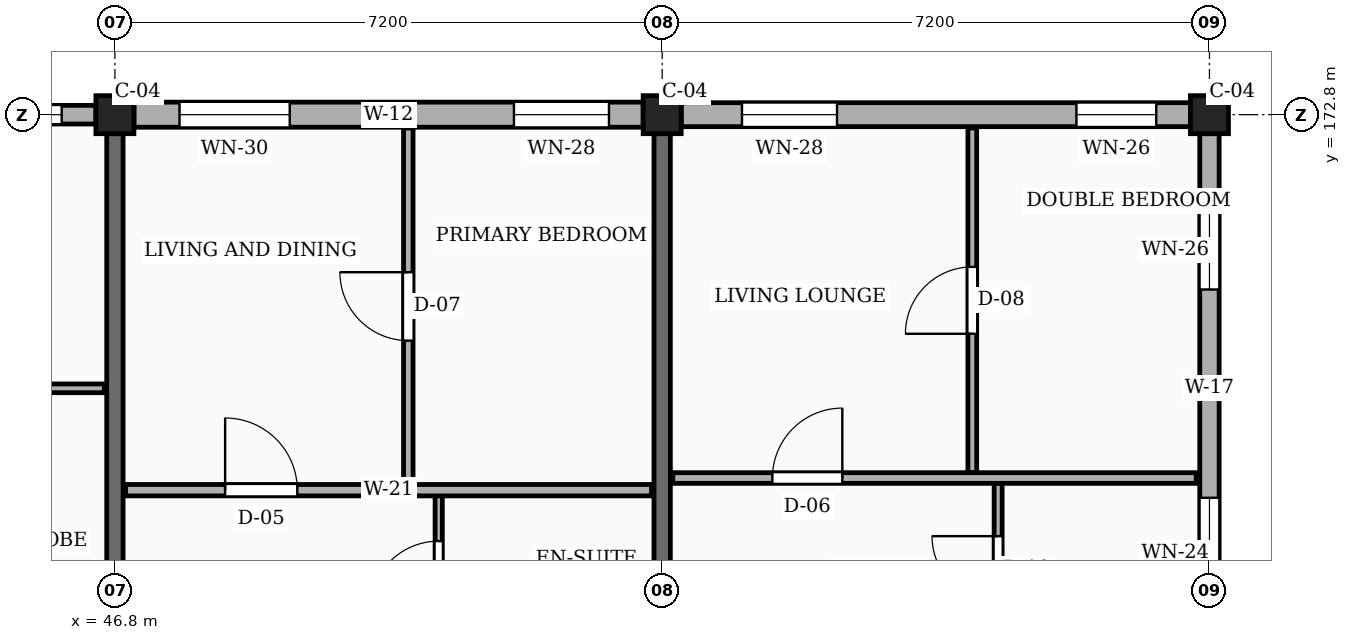
"""IFC4 building model, lengths in metres.
Left out: names, types, materials, properties, quantities, classifications, styles, units other than length and angle.
Written with IfcOpenShell. Run it as: python <this file> out.ifc"""

import sys

from ifc_helpers import new_model, si_unit, direction, frame, frame_2d, origin, origin_2d, place, context, subcontext, project, spatial, rectangle, extrude, element, fill, save


model = new_model("IFC4")
c1 = context("Model", 3, precision=1e-05, world=origin(), true_north=direction((0.0, 1.0)))
c2 = subcontext(c1, "Body", "Model", "MODEL_VIEW")
j1 = project(units=[si_unit("LENGTHUNIT", "METRE"), si_unit("PLANEANGLEUNIT", "RADIAN")], contexts=[c1])
p1 = place(None, origin())
s1 = spatial("IfcSite", under=j1, at=p1, CompositionType="ELEMENT")
p2 = place(p1, origin())
s2 = spatial("IfcBuilding", under=s1, at=p2, CompositionType="ELEMENT")
p3 = place(p2, frame((0.0, 0.0, 29.7)))
s3 = spatial("IfcBuildingStorey", under=s2, at=p3, CompositionType="ELEMENT", Elevation=29.7)
for number, where, z_axis, x_axis in (
    (1, (46.8, 172.8, 0.0), (0.0, 0.0, 1.0), (1.0, 0.0, 0.0)),
    (2, (54.0, 172.8, 0.0), (0.0, 0.0, 1.0), (1.0, 0.0, 0.0)),
    (3, (61.2, 172.8, 0.0), (0.0, 0.0, 1.0), (1.0, 0.0, 0.0)),
):
    element("IfcColumn", number, at=place(p3, frame(where, z_axis=z_axis, x_axis=x_axis)), inside=s3, PredefinedType="COLUMN", context=c2, shape_type="SweptSolid", body=[
        extrude(rectangle(XDim=0.5, YDim=0.5, at=origin_2d()), origin(), (0.0, 0.0, 1.0), 3.15),
    ])
for number, where, z_axis, x_axis in (
    (4, (46.8, 165.9, 0.0), (0.0, 0.0, 1.0), (0.0, 1.0, 0.0)),
    (5, (54.0, 165.9, 0.0), (0.0, 0.0, 1.0), (0.0, 1.0, 0.0)),
):
    element("IfcWall", number, at=place(p3, frame(where, z_axis=z_axis, x_axis=x_axis)), inside=s3, PredefinedType="SOLIDWALL", context=c2, shape_type="SweptSolid", body=[
        extrude(rectangle(XDim=6.65, YDim=0.215, at=frame_2d((3.325, 0.0))), origin(), (0.0, 0.0, 1.0), 2.185),
    ])
p4 = place(p3, frame((61.2, 165.85, 0.0), z_axis=(0.0, 0.0, 1.0), x_axis=(0.0, 1.0, 0.0)))
e6 = element("IfcWall", 6, at=p4, inside=s3, PredefinedType="SOLIDWALL", context=c2, shape_type="SweptSolid", body=[
    extrude(rectangle(XDim=6.7, YDim=0.255, at=frame_2d((3.35, 0.0))), origin(), (0.0, 0.0, 1.0), 2.455),
])
p5 = place(p4, frame((0.45, 0.0, 0.78)))
e7 = element("IfcOpeningElement", 7, at=p5, cuts=e6, PredefinedType="OPENING", context=c2, shape_type="SweptSolid", body=[
    extrude(rectangle(XDim=1.46, YDim=1.36, at=frame_2d((0.73, 0.68))), frame((0.0, 0.137, 0.0), z_axis=(0.0, -1.0, 0.0), x_axis=(1.0, 0.0, 0.0)), (0.0, 0.0, 1.0), 0.275),
])
p6 = place(p4, frame((4.65, 0.0, 0.78)))
e8 = element("IfcOpeningElement", 8, at=p6, cuts=e6, PredefinedType="OPENING", context=c2, shape_type="SweptSolid", body=[
    extrude(rectangle(XDim=1.05, YDim=1.44, at=frame_2d((0.525, 0.72))), frame((0.0, 0.137, 0.0), z_axis=(0.0, -1.0, 0.0), x_axis=(1.0, 0.0, 0.0)), (0.0, 0.0, 1.0), 0.275),
])
p7 = place(p3, frame((60.95, 172.8, 0.0), z_axis=(0.0, 0.0, 1.0), x_axis=(-1.0, 0.0, 0.0)))
e9 = element("IfcWall", 9, at=p7, inside=s3, PredefinedType="SOLIDWALL", context=c2, shape_type="SweptSolid", body=[
    extrude(rectangle(XDim=6.7, YDim=0.315, at=frame_2d((3.35, 0.0))), origin(), (0.0, 0.0, 1.0), 2.455),
])
p8 = place(p7, frame((0.45, 0.0, 0.78)))
e10 = element("IfcOpeningElement", 10, at=p8, cuts=e9, PredefinedType="OPENING", context=c2, shape_type="SweptSolid", body=[
    extrude(rectangle(XDim=1.05, YDim=1.44, at=frame_2d((0.525, 0.72))), frame((0.0, 0.167, 0.0), z_axis=(0.0, -1.0, 0.0), x_axis=(1.0, 0.0, 0.0)), (0.0, 0.0, 1.0), 0.335),
])
p9 = place(p7, frame((4.65, 0.0, 0.78)))
e11 = element("IfcOpeningElement", 11, at=p9, cuts=e9, PredefinedType="OPENING", context=c2, shape_type="SweptSolid", body=[
    extrude(rectangle(XDim=1.25, YDim=1.44, at=frame_2d((0.625, 0.72))), frame((0.0, 0.167, 0.0), z_axis=(0.0, -1.0, 0.0), x_axis=(1.0, 0.0, 0.0)), (0.0, 0.0, 1.0), 0.335),
])
p10 = place(p3, frame((53.75, 172.8, 0.0), z_axis=(0.0, 0.0, 1.0), x_axis=(-1.0, 0.0, 0.0)))
e12 = element("IfcWall", 12, at=p10, inside=s3, PredefinedType="SOLIDWALL", context=c2, shape_type="SweptSolid", body=[
    extrude(rectangle(XDim=6.7, YDim=0.33, at=frame_2d((3.35, 0.0))), origin(), (0.0, 0.0, 1.0), 2.455),
])
p11 = place(p10, frame((0.45, 0.0, 0.78)))
e13 = element("IfcOpeningElement", 13, at=p11, cuts=e12, PredefinedType="OPENING", context=c2, shape_type="SweptSolid", body=[
    extrude(rectangle(XDim=1.25, YDim=1.44, at=frame_2d((0.625, 0.72))), frame((0.0, 0.175, 0.0), z_axis=(0.0, -1.0, 0.0), x_axis=(1.0, 0.0, 0.0)), (0.0, 0.0, 1.0), 0.35),
])
p12 = place(p10, frame((4.65, 0.0, 0.78)))
e14 = element("IfcOpeningElement", 14, at=p12, cuts=e12, PredefinedType="OPENING", context=c2, shape_type="SweptSolid", body=[
    extrude(rectangle(XDim=1.45, YDim=1.44, at=frame_2d((0.725, 0.72))), frame((0.0, 0.175, 0.0), z_axis=(0.0, -1.0, 0.0), x_axis=(1.0, 0.0, 0.0)), (0.0, 0.0, 1.0), 0.35),
])
p13 = place(p3, frame((46.55, 172.8, 0.0), z_axis=(0.0, 0.0, 1.0), x_axis=(-1.0, 0.0, 0.0)))
e15 = element("IfcWall", 15, at=p13, inside=s3, PredefinedType="SOLIDWALL", context=c2, shape_type="SweptSolid", body=[
    extrude(rectangle(XDim=6.7, YDim=0.245, at=frame_2d((3.35, 0.0))), origin(), (0.0, 0.0, 1.0), 2.455),
])
p14 = place(p13, frame((0.45, 0.0, 0.78)))
e16 = element("IfcOpeningElement", 16, at=p14, cuts=e15, PredefinedType="OPENING", context=c2, shape_type="SweptSolid", body=[
    extrude(rectangle(XDim=1.45, YDim=1.44, at=frame_2d((0.725, 0.72))), frame((0.0, 0.133, 0.0), z_axis=(0.0, -1.0, 0.0), x_axis=(1.0, 0.0, 0.0)), (0.0, 0.0, 1.0), 0.265),
])
p15 = place(p13, frame((4.65, 0.0, 0.78)))
e17 = element("IfcOpeningElement", 17, at=p15, cuts=e15, PredefinedType="OPENING", context=c2, shape_type="SweptSolid", body=[
    extrude(rectangle(XDim=0.92, YDim=1.15, at=frame_2d((0.46, 0.575))), frame((0.0, 0.133, 0.0), z_axis=(0.0, -1.0, 0.0), x_axis=(1.0, 0.0, 0.0)), (0.0, 0.0, 1.0), 0.265),
])
p16 = place(p3, frame((39.74, 169.2, 0.0), z_axis=(0.0, 0.0, 1.0), x_axis=(1.0, 0.0, 0.0)))
e18 = element("IfcWall", 18, at=p16, inside=s3, PredefinedType="PARTITIONING", context=c2, shape_type="SweptSolid", body=[
    extrude(rectangle(XDim=6.92, YDim=0.115, at=frame_2d((3.46, 0.0))), origin(), (0.0, 0.0, 1.0), 2.32),
])
p17 = place(p16, frame((1.05, 0.0, 0.0)))
e19 = element("IfcOpeningElement", 19, at=p17, cuts=e18, PredefinedType="OPENING", context=c2, shape_type="SweptSolid", body=[
    extrude(rectangle(XDim=0.87, YDim=2.05, at=frame_2d((0.435, 1.025))), frame((0.0, 0.067, 0.0), z_axis=(0.0, -1.0, 0.0), x_axis=(1.0, 0.0, 0.0)), (0.0, 0.0, 1.0), 0.135),
])
p18 = place(p16, frame((4.45, 0.0, 0.0)))
e20 = element("IfcOpeningElement", 20, at=p18, cuts=e18, PredefinedType="OPENING", context=c2, shape_type="SweptSolid", body=[
    extrude(rectangle(XDim=0.88, YDim=2.08, at=frame_2d((0.44, 1.04))), frame((0.0, 0.067, 0.0), z_axis=(0.0, -1.0, 0.0), x_axis=(1.0, 0.0, 0.0)), (0.0, 0.0, 1.0), 0.135),
])
p19 = place(p3, frame((50.66, 167.93, 0.0), z_axis=(0.0, 0.0, 1.0), x_axis=(0.0, 1.0, 0.0)))
e21 = element("IfcWall", 21, at=p19, inside=s3, PredefinedType="PARTITIONING", context=c2, shape_type="SweptSolid", body=[
    extrude(rectangle(XDim=4.695, YDim=0.125, at=frame_2d((2.348, 0.0))), origin(), (0.0, 0.0, 1.0), 2.32),
])
p20 = place(p19, frame((1.897, 0.0, 0.0)))
e22 = element("IfcOpeningElement", 22, at=p20, cuts=e21, PredefinedType="OPENING", context=c2, shape_type="SweptSolid", body=[
    extrude(rectangle(XDim=0.9, YDim=2.1, at=frame_2d((0.45, 1.05))), frame((0.0, 0.073, 0.0), z_axis=(0.0, -1.0, 0.0), x_axis=(1.0, 0.0, 0.0)), (0.0, 0.0, 1.0), 0.145),
])
p21 = place(p3, frame((51.06, 165.69, 0.0), z_axis=(0.0, 0.0, 1.0), x_axis=(0.0, 1.0, 0.0)))
e23 = element("IfcWall", 23, at=p21, inside=s3, PredefinedType="PARTITIONING", context=c2, shape_type="SweptSolid", body=[
    extrude(rectangle(XDim=2.1, YDim=0.095, at=frame_2d((1.05, 0.0))), origin(), (0.0, 0.0, 1.0), 2.32),
])
p22 = place(p21, frame((0.6, 0.0, 0.0)))
e24 = element("IfcOpeningElement", 24, at=p22, cuts=e23, PredefinedType="OPENING", context=c2, shape_type="SweptSolid", body=[
    extrude(rectangle(XDim=0.9, YDim=2.05, at=frame_2d((0.45, 1.025))), frame((0.0, 0.058, 0.0), z_axis=(0.0, -1.0, 0.0), x_axis=(1.0, 0.0, 0.0)), (0.0, 0.0, 1.0), 0.115),
])
p23 = place(p3, frame((46.94, 167.86, 0.0), z_axis=(0.0, 0.0, 1.0), x_axis=(1.0, 0.0, 0.0)))
e25 = element("IfcWall", 25, at=p23, inside=s3, PredefinedType="PARTITIONING", context=c2, shape_type="SweptSolid", body=[
    extrude(rectangle(XDim=6.92, YDim=0.15, at=frame_2d((3.46, 0.0))), origin(), (0.0, 0.0, 1.0), 2.32),
])
p24 = place(p23, frame((1.31, 0.0, 0.0)))
e26 = element("IfcOpeningElement", 26, at=p24, cuts=e25, PredefinedType="OPENING", context=c2, shape_type="SweptSolid", body=[
    extrude(rectangle(XDim=0.95, YDim=2.1, at=frame_2d((0.475, 1.05))), frame((0.0, 0.085, 0.0), z_axis=(0.0, -1.0, 0.0), x_axis=(1.0, 0.0, 0.0)), (0.0, 0.0, 1.0), 0.17),
])
p25 = place(p3, frame((58.08, 168.09, 0.0), z_axis=(0.0, 0.0, 1.0), x_axis=(0.0, 1.0, 0.0)))
e27 = element("IfcWall", 27, at=p25, inside=s3, PredefinedType="PARTITIONING", context=c2, shape_type="SweptSolid", body=[
    extrude(rectangle(XDim=4.535, YDim=0.115, at=frame_2d((2.268, 0.0))), origin(), (0.0, 0.0, 1.0), 2.32),
])
p26 = place(p25, frame((1.827, 0.0, 0.0)))
e28 = element("IfcOpeningElement", 28, at=p26, cuts=e27, PredefinedType="OPENING", context=c2, shape_type="SweptSolid", body=[
    extrude(rectangle(XDim=0.88, YDim=2.08, at=frame_2d((0.44, 1.04))), frame((0.0, 0.067, 0.0), z_axis=(0.0, -1.0, 0.0), x_axis=(1.0, 0.0, 0.0)), (0.0, 0.0, 1.0), 0.135),
])
p27 = place(p3, frame((58.42, 165.69, 0.0), z_axis=(0.0, 0.0, 1.0), x_axis=(0.0, 1.0, 0.0)))
e29 = element("IfcWall", 29, at=p27, inside=s3, PredefinedType="PARTITIONING", context=c2, shape_type="SweptSolid", body=[
    extrude(rectangle(XDim=2.26, YDim=0.105, at=frame_2d((1.13, 0.0))), origin(), (0.0, 0.0, 1.0), 2.32),
])
p28 = place(p27, frame((0.695, 0.0, 0.0)))
e30 = element("IfcOpeningElement", 30, at=p28, cuts=e29, PredefinedType="OPENING", context=c2, shape_type="SweptSolid", body=[
    extrude(rectangle(XDim=0.87, YDim=2.05, at=frame_2d((0.435, 1.025))), frame((0.0, 0.062, 0.0), z_axis=(0.0, -1.0, 0.0), x_axis=(1.0, 0.0, 0.0)), (0.0, 0.0, 1.0), 0.125),
])
p29 = place(p3, frame((54.14, 168.02, 0.0), z_axis=(0.0, 0.0, 1.0), x_axis=(1.0, 0.0, 0.0)))
e31 = element("IfcWall", 31, at=p29, inside=s3, PredefinedType="PARTITIONING", context=c2, shape_type="SweptSolid", body=[
    extrude(rectangle(XDim=6.885, YDim=0.14, at=frame_2d((3.442, 0.0))), origin(), (0.0, 0.0, 1.0), 2.32),
])
p30 = place(p29, frame((1.31, 0.0, 0.0)))
e32 = element("IfcOpeningElement", 32, at=p30, cuts=e31, PredefinedType="OPENING", context=c2, shape_type="SweptSolid", body=[
    extrude(rectangle(XDim=0.92, YDim=2.1, at=frame_2d((0.46, 1.05))), frame((0.0, 0.08, 0.0), z_axis=(0.0, -1.0, 0.0), x_axis=(1.0, 0.0, 0.0)), (0.0, 0.0, 1.0), 0.16),
])
p31 = place(p5, origin())
e33 = element("IfcWindow", 33, at=p31, inside=s3, PartitioningType="SINGLE_PANEL", PredefinedType="WINDOW", context=c2, shape_type="SweptSolid", body=[
    extrude(rectangle(XDim=1.46, YDim=1.36, at=frame_2d((0.73, 0.68))), frame((0.0, 0.03, 0.0), z_axis=(0.0, -1.0, 0.0), x_axis=(1.0, 0.0, 0.0)), (0.0, 0.0, 1.0), 0.06),
])
fill(e7, e33)
p32 = place(p6, origin())
e34 = element("IfcWindow", 34, at=p32, inside=s3, PartitioningType="SINGLE_PANEL", PredefinedType="WINDOW", context=c2, shape_type="SweptSolid", body=[
    extrude(rectangle(XDim=1.05, YDim=1.44, at=frame_2d((0.525, 0.72))), frame((0.0, 0.03, 0.0), z_axis=(0.0, -1.0, 0.0), x_axis=(1.0, 0.0, 0.0)), (0.0, 0.0, 1.0), 0.06),
])
fill(e8, e34)
p33 = place(p8, origin())
e35 = element("IfcWindow", 35, at=p33, inside=s3, PartitioningType="SINGLE_PANEL", PredefinedType="WINDOW", context=c2, shape_type="SweptSolid", body=[
    extrude(rectangle(XDim=1.05, YDim=1.44, at=frame_2d((0.525, 0.72))), frame((0.0, 0.03, 0.0), z_axis=(0.0, -1.0, 0.0), x_axis=(1.0, 0.0, 0.0)), (0.0, 0.0, 1.0), 0.06),
])
fill(e10, e35)
p34 = place(p9, origin())
e36 = element("IfcWindow", 36, at=p34, inside=s3, PartitioningType="SINGLE_PANEL", PredefinedType="WINDOW", context=c2, shape_type="SweptSolid", body=[
    extrude(rectangle(XDim=1.25, YDim=1.44, at=frame_2d((0.625, 0.72))), frame((0.0, 0.03, 0.0), z_axis=(0.0, -1.0, 0.0), x_axis=(1.0, 0.0, 0.0)), (0.0, 0.0, 1.0), 0.06),
])
fill(e11, e36)
p35 = place(p11, origin())
e37 = element("IfcWindow", 37, at=p35, inside=s3, PartitioningType="SINGLE_PANEL", PredefinedType="WINDOW", context=c2, shape_type="SweptSolid", body=[
    extrude(rectangle(XDim=1.25, YDim=1.44, at=frame_2d((0.625, 0.72))), frame((0.0, 0.03, 0.0), z_axis=(0.0, -1.0, 0.0), x_axis=(1.0, 0.0, 0.0)), (0.0, 0.0, 1.0), 0.06),
])
fill(e13, e37)
p36 = place(p12, origin())
e38 = element("IfcWindow", 38, at=p36, inside=s3, PartitioningType="SINGLE_PANEL", PredefinedType="WINDOW", context=c2, shape_type="SweptSolid", body=[
    extrude(rectangle(XDim=1.45, YDim=1.44, at=frame_2d((0.725, 0.72))), frame((0.0, 0.03, 0.0), z_axis=(0.0, -1.0, 0.0), x_axis=(1.0, 0.0, 0.0)), (0.0, 0.0, 1.0), 0.06),
])
fill(e14, e38)
p37 = place(p14, origin())
e39 = element("IfcWindow", 39, at=p37, inside=s3, PartitioningType="SINGLE_PANEL", PredefinedType="WINDOW", context=c2, shape_type="SweptSolid", body=[
    extrude(rectangle(XDim=1.45, YDim=1.44, at=frame_2d((0.725, 0.72))), frame((0.0, 0.03, 0.0), z_axis=(0.0, -1.0, 0.0), x_axis=(1.0, 0.0, 0.0)), (0.0, 0.0, 1.0), 0.06),
])
fill(e16, e39)
p38 = place(p20, origin())
e40 = element("IfcDoor", 40, at=p38, inside=s3, OperationType="SINGLE_SWING_RIGHT", PredefinedType="DOOR", context=c2, shape_type="SweptSolid", body=[
    extrude(rectangle(XDim=0.9, YDim=2.1, at=frame_2d((0.45, 1.05))), frame((0.0, 0.025, 0.0), z_axis=(0.0, -1.0, 0.0), x_axis=(1.0, 0.0, 0.0)), (0.0, 0.0, 1.0), 0.05),
])
fill(e22, e40)
p39 = place(p22, origin())
e41 = element("IfcDoor", 41, at=p39, inside=s3, OperationType="SINGLE_SWING_LEFT", PredefinedType="DOOR", context=c2, shape_type="SweptSolid", body=[
    extrude(rectangle(XDim=0.9, YDim=2.05, at=frame_2d((0.45, 1.025))), frame((0.0, 0.025, 0.0), z_axis=(0.0, -1.0, 0.0), x_axis=(1.0, 0.0, 0.0)), (0.0, 0.0, 1.0), 0.05),
])
fill(e24, e41)
p40 = place(p24, origin())
e42 = element("IfcDoor", 42, at=p40, inside=s3, OperationType="SINGLE_SWING_LEFT", PredefinedType="DOOR", context=c2, shape_type="SweptSolid", body=[
    extrude(rectangle(XDim=0.95, YDim=2.1, at=frame_2d((0.475, 1.05))), frame((0.0, 0.025, 0.0), z_axis=(0.0, -1.0, 0.0), x_axis=(1.0, 0.0, 0.0)), (0.0, 0.0, 1.0), 0.05),
])
fill(e26, e42)
p41 = place(p26, origin())
e43 = element("IfcDoor", 43, at=p41, inside=s3, OperationType="SINGLE_SWING_LEFT", PredefinedType="DOOR", context=c2, shape_type="SweptSolid", body=[
    extrude(rectangle(XDim=0.88, YDim=2.08, at=frame_2d((0.44, 1.04))), frame((0.0, 0.025, 0.0), z_axis=(0.0, -1.0, 0.0), x_axis=(1.0, 0.0, 0.0)), (0.0, 0.0, 1.0), 0.05),
])
fill(e28, e43)
p42 = place(p28, origin())
e44 = element("IfcDoor", 44, at=p42, inside=s3, OperationType="SINGLE_SWING_RIGHT", PredefinedType="DOOR", context=c2, shape_type="SweptSolid", body=[
    extrude(rectangle(XDim=0.87, YDim=2.05, at=frame_2d((0.435, 1.025))), frame((0.0, 0.025, 0.0), z_axis=(0.0, -1.0, 0.0), x_axis=(1.0, 0.0, 0.0)), (0.0, 0.0, 1.0), 0.05),
])
fill(e30, e44)
p43 = place(p30, origin())
e45 = element("IfcDoor", 45, at=p43, inside=s3, OperationType="SINGLE_SWING_RIGHT", PredefinedType="DOOR", context=c2, shape_type="SweptSolid", body=[
    extrude(rectangle(XDim=0.92, YDim=2.1, at=frame_2d((0.46, 1.05))), frame((0.0, 0.025, 0.0), z_axis=(0.0, -1.0, 0.0), x_axis=(1.0, 0.0, 0.0)), (0.0, 0.0, 1.0), 0.05),
])
fill(e32, e45)
save(model, sys.argv[1])
